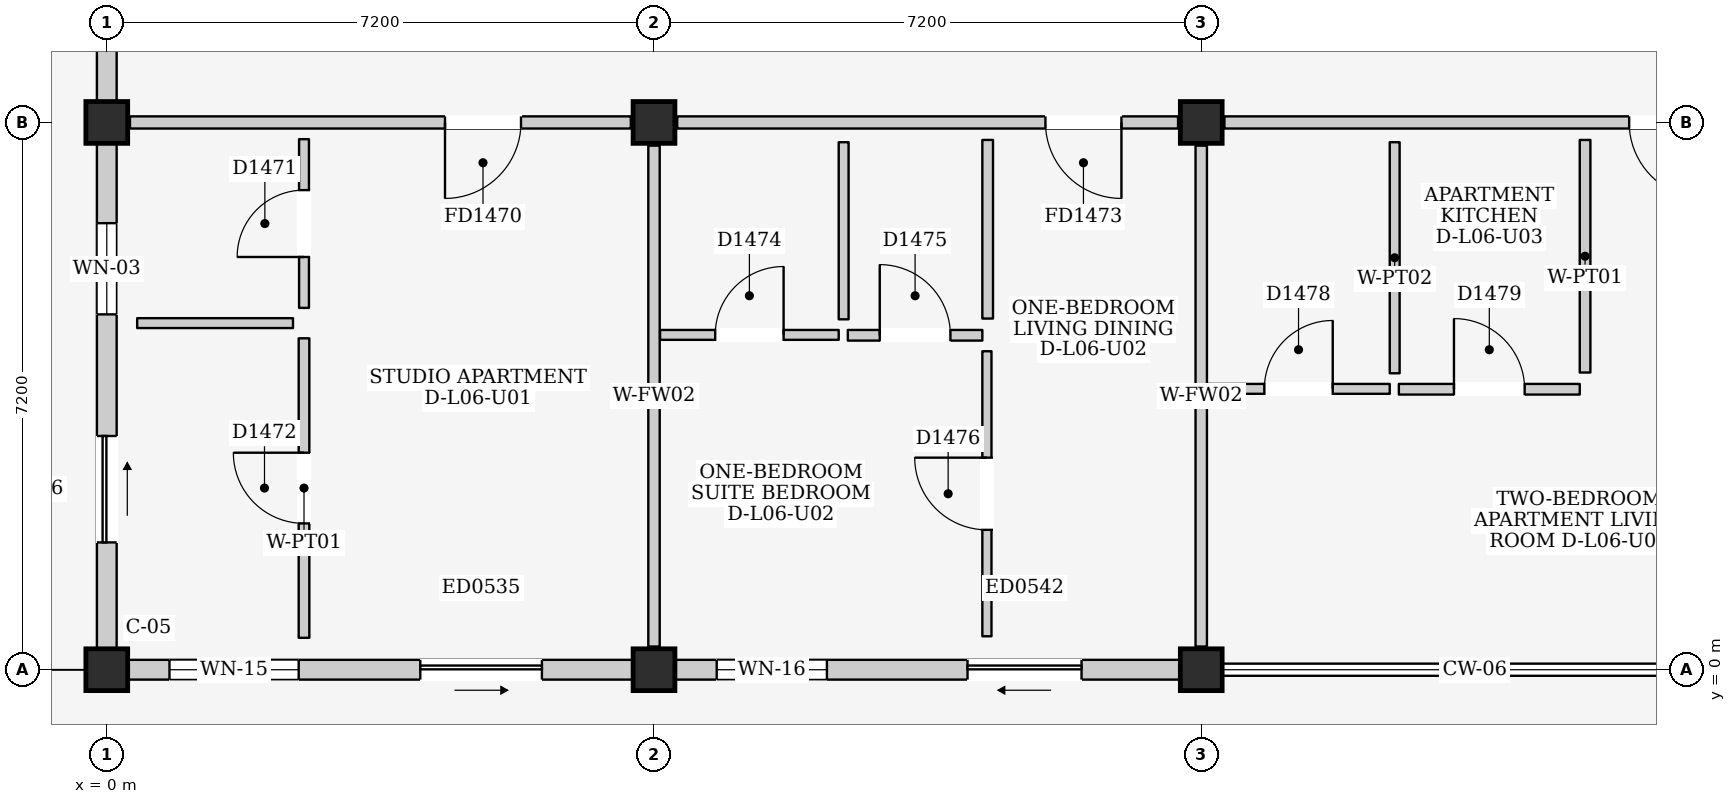
"""IFC4 building model, lengths in metres.
Left out: names, types, materials, properties, quantities, classifications, styles, units other than length and angle.
Written with IfcOpenShell. Run it as: python <this file> out.ifc"""

import sys

from ifc_helpers import new_model, si_unit, direction, frame, frame_2d, origin, origin_2d, place, context, subcontext, project, spatial, rectangle, extrude, element, fill, save


model = new_model("IFC4")
c1 = context("Model", 3, precision=1e-05, world=origin(), true_north=direction((0.0, 1.0)))
c2 = subcontext(c1, "Body", "Model", "MODEL_VIEW")
j1 = project(units=[si_unit("LENGTHUNIT", "METRE"), si_unit("PLANEANGLEUNIT", "RADIAN")], contexts=[c1])
p1 = place(None, origin())
s1 = spatial("IfcSite", under=j1, at=p1, CompositionType="ELEMENT")
p2 = place(p1, origin())
s2 = spatial("IfcBuilding", under=s1, at=p2, CompositionType="ELEMENT")
p3 = place(p2, frame((0.0, 0.0, 21.9)))
s3 = spatial("IfcBuildingStorey", under=s2, at=p3, CompositionType="ELEMENT", Elevation=21.9)
for number, where, z_axis, x_axis in (
    (1, (0.0, 0.0, 0.0), (0.0, 0.0, 1.0), (1.0, 0.0, 0.0)),
    (2, (0.0, 7.2, 0.0), (0.0, 0.0, 1.0), (1.0, 0.0, 0.0)),
    (3, (7.2, 0.0, 0.0), (0.0, 0.0, 1.0), (1.0, 0.0, 0.0)),
    (4, (7.2, 7.2, 0.0), (0.0, 0.0, 1.0), (1.0, 0.0, 0.0)),
    (5, (14.4, 0.0, 0.0), (0.0, 0.0, 1.0), (1.0, 0.0, 0.0)),
    (6, (14.4, 7.2, 0.0), (0.0, 0.0, 1.0), (1.0, 0.0, 0.0)),
):
    element("IfcColumn", number, at=place(p3, frame(where, z_axis=z_axis, x_axis=x_axis)), inside=s3, PredefinedType="COLUMN", context=c2, shape_type="SweptSolid", body=[
        extrude(rectangle(XDim=0.55, YDim=0.55, at=origin_2d()), origin(), (0.0, 0.0, 1.0), 3.2),
    ])
p4 = place(p3, frame((0.275, 0.0, 0.0), z_axis=(0.0, 0.0, 1.0), x_axis=(1.0, 0.0, 0.0)))
e7 = element("IfcWall", 7, at=p4, inside=s3, PredefinedType="ELEMENTEDWALL", context=c2, shape_type="SweptSolid", body=[
    extrude(rectangle(XDim=6.65, YDim=0.26, at=frame_2d((3.325, 0.0))), origin(), (0.0, 0.0, 1.0), 2.515),
])
p5 = place(p4, frame((3.85, 0.0, 0.0)))
e8 = element("IfcOpeningElement", 8, at=p5, cuts=e7, PredefinedType="OPENING", context=c2, shape_type="SweptSolid", body=[
    extrude(rectangle(XDim=1.6, YDim=2.12, at=frame_2d((0.8, 1.06))), frame((0.0, 0.145, 0.0), z_axis=(0.0, -1.0, 0.0), x_axis=(1.0, 0.0, 0.0)), (0.0, 0.0, 1.0), 0.29),
])
p6 = place(p4, frame((0.55, 0.0, 0.9)))
e9 = element("IfcOpeningElement", 9, at=p6, cuts=e7, PredefinedType="OPENING", context=c2, shape_type="SweptSolid", body=[
    extrude(rectangle(XDim=1.7, YDim=1.45, at=frame_2d((0.85, 0.725))), frame((0.0, 0.145, 0.0), z_axis=(0.0, -1.0, 0.0), x_axis=(1.0, 0.0, 0.0)), (0.0, 0.0, 1.0), 0.29),
])
p7 = place(p3, frame((0.0, 0.275, 0.0), z_axis=(0.0, 0.0, 1.0), x_axis=(0.0, 1.0, 0.0)))
e10 = element("IfcWall", 10, at=p7, inside=s3, PredefinedType="ELEMENTEDWALL", context=c2, shape_type="SweptSolid", body=[
    extrude(rectangle(XDim=6.65, YDim=0.26, at=frame_2d((3.325, 0.0))), origin(), (0.0, 0.0, 1.0), 2.515),
])
p8 = place(p7, frame((1.4, 0.0, 0.0)))
e11 = element("IfcOpeningElement", 11, at=p8, cuts=e10, PredefinedType="OPENING", context=c2, shape_type="SweptSolid", body=[
    extrude(rectangle(XDim=1.4, YDim=2.1, at=frame_2d((0.7, 1.05))), frame((0.0, 0.145, 0.0), z_axis=(0.0, -1.0, 0.0), x_axis=(1.0, 0.0, 0.0)), (0.0, 0.0, 1.0), 0.29),
])
p9 = place(p7, frame((4.4, 0.0, 0.95)))
e12 = element("IfcOpeningElement", 12, at=p9, cuts=e10, PredefinedType="OPENING", context=c2, shape_type="SweptSolid", body=[
    extrude(rectangle(XDim=1.2, YDim=1.35, at=frame_2d((0.6, 0.675))), frame((0.0, 0.145, 0.0), z_axis=(0.0, -1.0, 0.0), x_axis=(1.0, 0.0, 0.0)), (0.0, 0.0, 1.0), 0.29),
])
p10 = place(p3, frame((0.0, 7.475, 0.0), z_axis=(0.0, 0.0, 1.0), x_axis=(0.0, 1.0, 0.0)))
e13 = element("IfcWall", 13, at=p10, inside=s3, PredefinedType="ELEMENTEDWALL", context=c2, shape_type="SweptSolid", body=[
    extrude(rectangle(XDim=6.65, YDim=0.26, at=frame_2d((3.325, 0.0))), origin(), (0.0, 0.0, 1.0), 2.515),
])
p11 = place(p10, frame((3.65, 0.0, 0.0)))
e14 = element("IfcOpeningElement", 14, at=p11, cuts=e13, PredefinedType="OPENING", context=c2, shape_type="SweptSolid", body=[
    extrude(rectangle(XDim=1.4, YDim=2.1, at=frame_2d((0.7, 1.05))), frame((0.0, 0.145, 0.0), z_axis=(0.0, -1.0, 0.0), x_axis=(1.0, 0.0, 0.0)), (0.0, 0.0, 1.0), 0.29),
])
p12 = place(p3, frame((7.475, 0.0, 0.0), z_axis=(0.0, 0.0, 1.0), x_axis=(1.0, 0.0, 0.0)))
e15 = element("IfcWall", 15, at=p12, inside=s3, PredefinedType="ELEMENTEDWALL", context=c2, shape_type="SweptSolid", body=[
    extrude(rectangle(XDim=6.65, YDim=0.26, at=frame_2d((3.325, 0.0))), origin(), (0.0, 0.0, 1.0), 2.515),
])
p13 = place(p12, frame((3.85, 0.0, 0.0)))
e16 = element("IfcOpeningElement", 16, at=p13, cuts=e15, PredefinedType="OPENING", context=c2, shape_type="SweptSolid", body=[
    extrude(rectangle(XDim=1.5, YDim=2.12, at=frame_2d((0.75, 1.06))), frame((0.0, 0.145, 0.0), z_axis=(0.0, -1.0, 0.0), x_axis=(1.0, 0.0, 0.0)), (0.0, 0.0, 1.0), 0.29),
])
p14 = place(p12, frame((0.55, 0.0, 0.9)))
e17 = element("IfcOpeningElement", 17, at=p14, cuts=e15, PredefinedType="OPENING", context=c2, shape_type="SweptSolid", body=[
    extrude(rectangle(XDim=1.45, YDim=1.4, at=frame_2d((0.725, 0.7))), frame((0.0, 0.145, 0.0), z_axis=(0.0, -1.0, 0.0), x_axis=(1.0, 0.0, 0.0)), (0.0, 0.0, 1.0), 0.29),
])
p15 = place(p3, frame((0.305, 7.2, 0.0), z_axis=(0.0, 0.0, 1.0), x_axis=(1.0, 0.0, 0.0)))
e18 = element("IfcWall", 18, at=p15, inside=s3, PredefinedType="PARTITIONING", context=c2, shape_type="SweptSolid", body=[
    extrude(rectangle(XDim=6.59, YDim=0.16, at=frame_2d((3.295, 0.0))), origin(), (0.0, 0.0, 1.0), 2.365),
])
p16 = place(p15, frame((4.145, 0.0, 0.0)))
e19 = element("IfcOpeningElement", 19, at=p16, cuts=e18, PredefinedType="OPENING", context=c2, shape_type="SweptSolid", body=[
    extrude(rectangle(XDim=1.0, YDim=2.15, at=frame_2d((0.5, 1.075))), frame((0.0, 0.095, 0.0), z_axis=(0.0, -1.0, 0.0), x_axis=(1.0, 0.0, 0.0)), (0.0, 0.0, 1.0), 0.19),
])
p17 = place(p3, frame((7.2, 0.305, 0.0), z_axis=(0.0, 0.0, 1.0), x_axis=(0.0, 1.0, 0.0)))
e20 = element("IfcWall", 20, at=p17, inside=s3, PredefinedType="PARTITIONING", context=c2, shape_type="SweptSolid", body=[
    extrude(rectangle(XDim=6.59, YDim=0.15, at=frame_2d((3.295, 0.0))), origin(), (0.0, 0.0, 1.0), 2.465),
])
p18 = place(p3, frame((0.4, 4.56, 0.0), z_axis=(0.0, 0.0, 1.0), x_axis=(1.0, 0.0, 0.0)))
e21 = element("IfcWall", 21, at=p18, inside=s3, PredefinedType="PARTITIONING", context=c2, shape_type="SweptSolid", body=[
    extrude(rectangle(XDim=2.05, YDim=0.13, at=frame_2d((1.025, 0.0))), origin(), (0.0, 0.0, 1.0), 2.98),
])
p19 = place(p3, frame((2.595, 4.76, 0.0), z_axis=(0.0, 0.0, 1.0), x_axis=(0.0, 1.0, 0.0)))
e22 = element("IfcWall", 22, at=p19, inside=s3, PredefinedType="PARTITIONING", context=c2, shape_type="SweptSolid", body=[
    extrude(rectangle(XDim=2.22, YDim=0.13, at=frame_2d((1.11, 0.0))), origin(), (0.0, 0.0, 1.0), 2.98),
])
p20 = place(p19, frame((0.67, 0.0, 0.0)))
e23 = element("IfcOpeningElement", 23, at=p20, cuts=e22, PredefinedType="OPENING", context=c2, shape_type="SweptSolid", body=[
    extrude(rectangle(XDim=0.88, YDim=2.1, at=frame_2d((0.44, 1.05))), frame((0.0, 0.08, 0.0), z_axis=(0.0, -1.0, 0.0), x_axis=(1.0, 0.0, 0.0)), (0.0, 0.0, 1.0), 0.16),
])
p21 = place(p3, frame((2.595, 0.42, 0.0), z_axis=(0.0, 0.0, 1.0), x_axis=(0.0, 1.0, 0.0)))
e24 = element("IfcWall", 24, at=p21, inside=s3, PredefinedType="PARTITIONING", context=c2, shape_type="SweptSolid", body=[
    extrude(rectangle(XDim=3.94, YDim=0.14, at=frame_2d((1.97, 0.0))), origin(), (0.0, 0.0, 1.0), 2.98),
])
p22 = place(p21, frame((1.505, 0.0, 0.0)))
e25 = element("IfcOpeningElement", 25, at=p22, cuts=e24, PredefinedType="OPENING", context=c2, shape_type="SweptSolid", body=[
    extrude(rectangle(XDim=0.93, YDim=2.14, at=frame_2d((0.465, 1.07))), frame((0.0, 0.085, 0.0), z_axis=(0.0, -1.0, 0.0), x_axis=(1.0, 0.0, 0.0)), (0.0, 0.0, 1.0), 0.17),
])
p23 = place(p3, frame((7.505, 7.2, 0.0), z_axis=(0.0, 0.0, 1.0), x_axis=(1.0, 0.0, 0.0)))
e26 = element("IfcWall", 26, at=p23, inside=s3, PredefinedType="PARTITIONING", context=c2, shape_type="SweptSolid", body=[
    extrude(rectangle(XDim=6.59, YDim=0.16, at=frame_2d((3.295, 0.0))), origin(), (0.0, 0.0, 1.0), 2.365),
])
p24 = place(p23, frame((4.845, 0.0, 0.0)))
e27 = element("IfcOpeningElement", 27, at=p24, cuts=e26, PredefinedType="OPENING", context=c2, shape_type="SweptSolid", body=[
    extrude(rectangle(XDim=1.0, YDim=2.15, at=frame_2d((0.5, 1.075))), frame((0.0, 0.095, 0.0), z_axis=(0.0, -1.0, 0.0), x_axis=(1.0, 0.0, 0.0)), (0.0, 0.0, 1.0), 0.19),
])
p25 = place(p3, frame((14.4, 0.305, 0.0), z_axis=(0.0, 0.0, 1.0), x_axis=(0.0, 1.0, 0.0)))
e28 = element("IfcWall", 28, at=p25, inside=s3, PredefinedType="PARTITIONING", context=c2, shape_type="SweptSolid", body=[
    extrude(rectangle(XDim=6.59, YDim=0.15, at=frame_2d((3.295, 0.0))), origin(), (0.0, 0.0, 1.0), 2.465),
])
p26 = place(p3, frame((7.28, 4.405, 0.0), z_axis=(0.0, 0.0, 1.0), x_axis=(1.0, 0.0, 0.0)))
e29 = element("IfcWall", 29, at=p26, inside=s3, PredefinedType="PARTITIONING", context=c2, shape_type="SweptSolid", body=[
    extrude(rectangle(XDim=2.35, YDim=0.13, at=frame_2d((1.175, 0.0))), origin(), (0.0, 0.0, 1.0), 2.98),
])
p27 = place(p26, frame((0.725, 0.0, 0.0)))
e30 = element("IfcOpeningElement", 30, at=p27, cuts=e29, PredefinedType="OPENING", context=c2, shape_type="SweptSolid", body=[
    extrude(rectangle(XDim=0.9, YDim=2.1, at=frame_2d((0.45, 1.05))), frame((0.0, 0.08, 0.0), z_axis=(0.0, -1.0, 0.0), x_axis=(1.0, 0.0, 0.0)), (0.0, 0.0, 1.0), 0.16),
])
p28 = place(p3, frame((9.695, 4.61, 0.0), z_axis=(0.0, 0.0, 1.0), x_axis=(0.0, 1.0, 0.0)))
e31 = element("IfcWall", 31, at=p28, inside=s3, PredefinedType="PARTITIONING", context=c2, shape_type="SweptSolid", body=[
    extrude(rectangle(XDim=2.33, YDim=0.13, at=frame_2d((1.165, 0.0))), origin(), (0.0, 0.0, 1.0), 2.98),
])
p29 = place(p3, frame((9.75, 4.4, 0.0), z_axis=(0.0, 0.0, 1.0), x_axis=(1.0, 0.0, 0.0)))
e32 = element("IfcWall", 32, at=p29, inside=s3, PredefinedType="PARTITIONING", context=c2, shape_type="SweptSolid", body=[
    extrude(rectangle(XDim=1.77, YDim=0.14, at=frame_2d((0.885, 0.0))), origin(), (0.0, 0.0, 1.0), 2.98),
])
p30 = place(p29, frame((0.42, 0.0, 0.0)))
e33 = element("IfcOpeningElement", 33, at=p30, cuts=e32, PredefinedType="OPENING", context=c2, shape_type="SweptSolid", body=[
    extrude(rectangle(XDim=0.93, YDim=2.14, at=frame_2d((0.465, 1.07))), frame((0.0, 0.085, 0.0), z_axis=(0.0, -1.0, 0.0), x_axis=(1.0, 0.0, 0.0)), (0.0, 0.0, 1.0), 0.17),
])
p31 = place(p3, frame((11.59, 4.62, 0.0), z_axis=(0.0, 0.0, 1.0), x_axis=(0.0, 1.0, 0.0)))
e34 = element("IfcWall", 34, at=p31, inside=s3, PredefinedType="PARTITIONING", context=c2, shape_type="SweptSolid", body=[
    extrude(rectangle(XDim=2.35, YDim=0.14, at=frame_2d((1.175, 0.0))), origin(), (0.0, 0.0, 1.0), 2.98),
])
p32 = place(p3, frame((11.58, 0.44, 0.0), z_axis=(0.0, 0.0, 1.0), x_axis=(0.0, 1.0, 0.0)))
e35 = element("IfcWall", 35, at=p32, inside=s3, PredefinedType="PARTITIONING", context=c2, shape_type="SweptSolid", body=[
    extrude(rectangle(XDim=3.75, YDim=0.12, at=frame_2d((1.875, 0.0))), origin(), (0.0, 0.0, 1.0), 2.98),
])
p33 = place(p32, frame((1.4, 0.0, 0.0)))
e36 = element("IfcOpeningElement", 36, at=p33, cuts=e35, PredefinedType="OPENING", context=c2, shape_type="SweptSolid", body=[
    extrude(rectangle(XDim=0.95, YDim=2.15, at=frame_2d((0.475, 1.075))), frame((0.0, 0.075, 0.0), z_axis=(0.0, -1.0, 0.0), x_axis=(1.0, 0.0, 0.0)), (0.0, 0.0, 1.0), 0.15),
])
p34 = place(p3, frame((14.705, 7.2, 0.0), z_axis=(0.0, 0.0, 1.0), x_axis=(1.0, 0.0, 0.0)))
e37 = element("IfcWall", 37, at=p34, inside=s3, PredefinedType="PARTITIONING", context=c2, shape_type="SweptSolid", body=[
    extrude(rectangle(XDim=6.59, YDim=0.16, at=frame_2d((3.295, 0.0))), origin(), (0.0, 0.0, 1.0), 2.365),
])
p35 = place(p34, frame((5.325, 0.0, 0.0)))
e38 = element("IfcOpeningElement", 38, at=p35, cuts=e37, PredefinedType="OPENING", context=c2, shape_type="SweptSolid", body=[
    extrude(rectangle(XDim=1.0, YDim=2.15, at=frame_2d((0.5, 1.075))), frame((0.0, 0.095, 0.0), z_axis=(0.0, -1.0, 0.0), x_axis=(1.0, 0.0, 0.0)), (0.0, 0.0, 1.0), 0.19),
])
p36 = place(p3, frame((14.48, 3.695, 0.0), z_axis=(0.0, 0.0, 1.0), x_axis=(1.0, 0.0, 0.0)))
e39 = element("IfcWall", 39, at=p36, inside=s3, PredefinedType="PARTITIONING", context=c2, shape_type="SweptSolid", body=[
    extrude(rectangle(XDim=2.4, YDim=0.13, at=frame_2d((1.2, 0.0))), origin(), (0.0, 0.0, 1.0), 2.98),
])
p37 = place(p36, frame((0.75, 0.0, 0.0)))
e40 = element("IfcOpeningElement", 40, at=p37, cuts=e39, PredefinedType="OPENING", context=c2, shape_type="SweptSolid", body=[
    extrude(rectangle(XDim=0.9, YDim=2.1, at=frame_2d((0.45, 1.05))), frame((0.0, 0.08, 0.0), z_axis=(0.0, -1.0, 0.0), x_axis=(1.0, 0.0, 0.0)), (0.0, 0.0, 1.0), 0.16),
])
p38 = place(p3, frame((16.945, 3.9, 0.0), z_axis=(0.0, 0.0, 1.0), x_axis=(0.0, 1.0, 0.0)))
e41 = element("IfcWall", 41, at=p38, inside=s3, PredefinedType="PARTITIONING", context=c2, shape_type="SweptSolid", body=[
    extrude(rectangle(XDim=3.04, YDim=0.13, at=frame_2d((1.52, 0.0))), origin(), (0.0, 0.0, 1.0), 2.98),
])
p39 = place(p3, frame((17.0, 3.69, 0.0), z_axis=(0.0, 0.0, 1.0), x_axis=(1.0, 0.0, 0.0)))
e42 = element("IfcWall", 42, at=p39, inside=s3, PredefinedType="PARTITIONING", context=c2, shape_type="SweptSolid", body=[
    extrude(rectangle(XDim=2.38, YDim=0.14, at=frame_2d((1.19, 0.0))), origin(), (0.0, 0.0, 1.0), 2.98),
])
p40 = place(p39, frame((0.725, 0.0, 0.0)))
e43 = element("IfcOpeningElement", 43, at=p40, cuts=e42, PredefinedType="OPENING", context=c2, shape_type="SweptSolid", body=[
    extrude(rectangle(XDim=0.93, YDim=2.14, at=frame_2d((0.465, 1.07))), frame((0.0, 0.085, 0.0), z_axis=(0.0, -1.0, 0.0), x_axis=(1.0, 0.0, 0.0)), (0.0, 0.0, 1.0), 0.17),
])
p41 = place(p3, frame((19.45, 3.91, 0.0), z_axis=(0.0, 0.0, 1.0), x_axis=(0.0, 1.0, 0.0)))
e44 = element("IfcWall", 44, at=p41, inside=s3, PredefinedType="PARTITIONING", context=c2, shape_type="SweptSolid", body=[
    extrude(rectangle(XDim=3.06, YDim=0.14, at=frame_2d((1.53, 0.0))), origin(), (0.0, 0.0, 1.0), 2.98),
])
p42 = place(p5, frame((1.6, 0.0, 0.0), z_axis=(0.0, 0.0, 1.0), x_axis=(-1.0, 0.0, 0.0)))
e45 = element("IfcDoor", 45, at=p42, inside=s3, OperationType="SLIDING_TO_RIGHT", PredefinedType="DOOR", context=c2, shape_type="SweptSolid", body=[
    extrude(rectangle(XDim=1.6, YDim=2.12, at=frame_2d((0.8, 1.06))), frame((0.0, 0.025, 0.0), z_axis=(0.0, -1.0, 0.0), x_axis=(1.0, 0.0, 0.0)), (0.0, 0.0, 1.0), 0.05),
])
fill(e8, e45)
p43 = place(p6, origin())
e46 = element("IfcWindow", 46, at=p43, inside=s3, PartitioningType="DOUBLE_PANEL_VERTICAL", PredefinedType="WINDOW", context=c2, shape_type="SweptSolid", body=[
    extrude(rectangle(XDim=1.7, YDim=1.45, at=frame_2d((0.85, 0.725))), frame((0.0, 0.03, 0.0), z_axis=(0.0, -1.0, 0.0), x_axis=(1.0, 0.0, 0.0)), (0.0, 0.0, 1.0), 0.06),
])
fill(e9, e46)
p44 = place(p8, frame((1.4, 0.0, 0.0), z_axis=(0.0, 0.0, 1.0), x_axis=(-1.0, 0.0, 0.0)))
e47 = element("IfcDoor", 47, at=p44, inside=s3, OperationType="SLIDING_TO_RIGHT", PredefinedType="DOOR", context=c2, shape_type="SweptSolid", body=[
    extrude(rectangle(XDim=1.4, YDim=2.1, at=frame_2d((0.7, 1.05))), frame((0.0, 0.025, 0.0), z_axis=(0.0, -1.0, 0.0), x_axis=(1.0, 0.0, 0.0)), (0.0, 0.0, 1.0), 0.05),
])
fill(e11, e47)
p45 = place(p9, origin())
e48 = element("IfcWindow", 48, at=p45, inside=s3, PartitioningType="SINGLE_PANEL", PredefinedType="WINDOW", context=c2, shape_type="SweptSolid", body=[
    extrude(rectangle(XDim=1.2, YDim=1.35, at=frame_2d((0.6, 0.675))), frame((0.0, 0.03, 0.0), z_axis=(0.0, -1.0, 0.0), x_axis=(1.0, 0.0, 0.0)), (0.0, 0.0, 1.0), 0.06),
])
fill(e12, e48)
p46 = place(p13, frame((1.5, 0.0, 0.0), z_axis=(0.0, 0.0, 1.0), x_axis=(-1.0, 0.0, 0.0)))
e49 = element("IfcDoor", 49, at=p46, inside=s3, OperationType="SLIDING_TO_LEFT", PredefinedType="DOOR", context=c2, shape_type="SweptSolid", body=[
    extrude(rectangle(XDim=1.5, YDim=2.12, at=frame_2d((0.75, 1.06))), frame((0.0, 0.025, 0.0), z_axis=(0.0, -1.0, 0.0), x_axis=(1.0, 0.0, 0.0)), (0.0, 0.0, 1.0), 0.05),
])
fill(e16, e49)
p47 = place(p14, origin())
e50 = element("IfcWindow", 50, at=p47, inside=s3, PartitioningType="DOUBLE_PANEL_VERTICAL", PredefinedType="WINDOW", context=c2, shape_type="SweptSolid", body=[
    extrude(rectangle(XDim=1.45, YDim=1.4, at=frame_2d((0.725, 0.7))), frame((0.0, 0.03, 0.0), z_axis=(0.0, -1.0, 0.0), x_axis=(1.0, 0.0, 0.0)), (0.0, 0.0, 1.0), 0.06),
])
fill(e17, e50)
p48 = place(p16, frame((1.0, 0.0, 0.0), z_axis=(0.0, 0.0, 1.0), x_axis=(-1.0, 0.0, 0.0)))
e51 = element("IfcDoor", 51, at=p48, inside=s3, OperationType="SINGLE_SWING_RIGHT", PredefinedType="DOOR", context=c2, shape_type="SweptSolid", body=[
    extrude(rectangle(XDim=1.0, YDim=2.15, at=frame_2d((0.5, 1.075))), frame((0.0, 0.025, 0.0), z_axis=(0.0, -1.0, 0.0), x_axis=(1.0, 0.0, 0.0)), (0.0, 0.0, 1.0), 0.05),
])
fill(e19, e51)
p49 = place(p20, origin())
e52 = element("IfcDoor", 52, at=p49, inside=s3, OperationType="SINGLE_SWING_LEFT", PredefinedType="DOOR", context=c2, shape_type="SweptSolid", body=[
    extrude(rectangle(XDim=0.88, YDim=2.1, at=frame_2d((0.44, 1.05))), frame((0.0, 0.025, 0.0), z_axis=(0.0, -1.0, 0.0), x_axis=(1.0, 0.0, 0.0)), (0.0, 0.0, 1.0), 0.05),
])
fill(e23, e52)
p50 = place(p22, origin())
e53 = element("IfcDoor", 53, at=p50, inside=s3, OperationType="SINGLE_SWING_RIGHT", PredefinedType="DOOR", context=c2, shape_type="SweptSolid", body=[
    extrude(rectangle(XDim=0.93, YDim=2.14, at=frame_2d((0.465, 1.07))), frame((0.0, 0.025, 0.0), z_axis=(0.0, -1.0, 0.0), x_axis=(1.0, 0.0, 0.0)), (0.0, 0.0, 1.0), 0.05),
])
fill(e25, e53)
p51 = place(p24, frame((1.0, 0.0, 0.0), z_axis=(0.0, 0.0, 1.0), x_axis=(-1.0, 0.0, 0.0)))
e54 = element("IfcDoor", 54, at=p51, inside=s3, OperationType="SINGLE_SWING_LEFT", PredefinedType="DOOR", context=c2, shape_type="SweptSolid", body=[
    extrude(rectangle(XDim=1.0, YDim=2.15, at=frame_2d((0.5, 1.075))), frame((0.0, 0.025, 0.0), z_axis=(0.0, -1.0, 0.0), x_axis=(1.0, 0.0, 0.0)), (0.0, 0.0, 1.0), 0.05),
])
fill(e27, e54)
p52 = place(p27, origin())
e55 = element("IfcDoor", 55, at=p52, inside=s3, OperationType="SINGLE_SWING_RIGHT", PredefinedType="DOOR", context=c2, shape_type="SweptSolid", body=[
    extrude(rectangle(XDim=0.9, YDim=2.1, at=frame_2d((0.45, 1.05))), frame((0.0, 0.025, 0.0), z_axis=(0.0, -1.0, 0.0), x_axis=(1.0, 0.0, 0.0)), (0.0, 0.0, 1.0), 0.05),
])
fill(e30, e55)
p53 = place(p30, origin())
e56 = element("IfcDoor", 56, at=p53, inside=s3, OperationType="SINGLE_SWING_LEFT", PredefinedType="DOOR", context=c2, shape_type="SweptSolid", body=[
    extrude(rectangle(XDim=0.93, YDim=2.14, at=frame_2d((0.465, 1.07))), frame((0.0, 0.025, 0.0), z_axis=(0.0, -1.0, 0.0), x_axis=(1.0, 0.0, 0.0)), (0.0, 0.0, 1.0), 0.05),
])
fill(e33, e56)
p54 = place(p33, origin())
e57 = element("IfcDoor", 57, at=p54, inside=s3, OperationType="SINGLE_SWING_RIGHT", PredefinedType="DOOR", context=c2, shape_type="SweptSolid", body=[
    extrude(rectangle(XDim=0.95, YDim=2.15, at=frame_2d((0.475, 1.075))), frame((0.0, 0.025, 0.0), z_axis=(0.0, -1.0, 0.0), x_axis=(1.0, 0.0, 0.0)), (0.0, 0.0, 1.0), 0.05),
])
fill(e36, e57)
p55 = place(p35, frame((1.0, 0.0, 0.0), z_axis=(0.0, 0.0, 1.0), x_axis=(-1.0, 0.0, 0.0)))
e58 = element("IfcDoor", 58, at=p55, inside=s3, OperationType="SINGLE_SWING_LEFT", PredefinedType="DOOR", context=c2, shape_type="SweptSolid", body=[
    extrude(rectangle(XDim=1.0, YDim=2.15, at=frame_2d((0.5, 1.075))), frame((0.0, 0.025, 0.0), z_axis=(0.0, -1.0, 0.0), x_axis=(1.0, 0.0, 0.0)), (0.0, 0.0, 1.0), 0.05),
])
fill(e38, e58)
p56 = place(p37, origin())
e59 = element("IfcDoor", 59, at=p56, inside=s3, OperationType="SINGLE_SWING_RIGHT", PredefinedType="DOOR", context=c2, shape_type="SweptSolid", body=[
    extrude(rectangle(XDim=0.9, YDim=2.1, at=frame_2d((0.45, 1.05))), frame((0.0, 0.025, 0.0), z_axis=(0.0, -1.0, 0.0), x_axis=(1.0, 0.0, 0.0)), (0.0, 0.0, 1.0), 0.05),
])
fill(e40, e59)
p57 = place(p40, origin())
e60 = element("IfcDoor", 60, at=p57, inside=s3, OperationType="SINGLE_SWING_LEFT", PredefinedType="DOOR", context=c2, shape_type="SweptSolid", body=[
    extrude(rectangle(XDim=0.93, YDim=2.14, at=frame_2d((0.465, 1.07))), frame((0.0, 0.025, 0.0), z_axis=(0.0, -1.0, 0.0), x_axis=(1.0, 0.0, 0.0)), (0.0, 0.0, 1.0), 0.05),
])
fill(e43, e60)
save(model, sys.argv[1])
